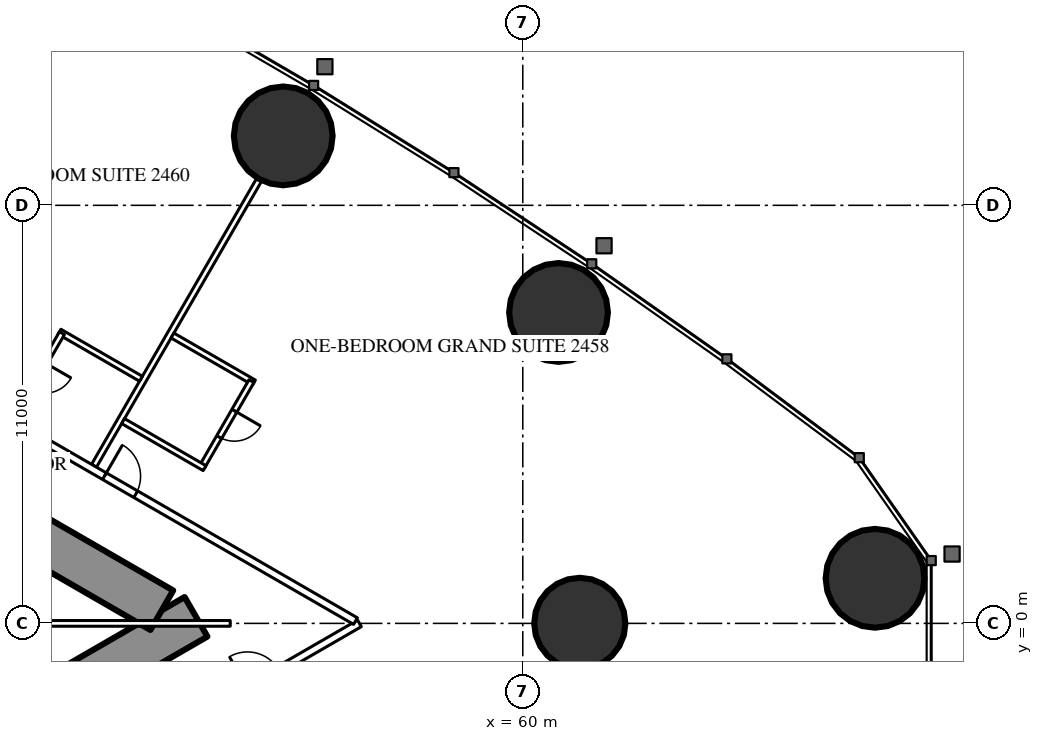
"""IFC4 building model, lengths in metres.
Left out: names, types, materials, properties, quantities, classifications, styles, units other than length and angle.
Written with IfcOpenShell. Run it as: python <this file> out.ifc"""

import sys

from ifc_helpers import new_model, si_unit, direction, frame, frame_2d, origin, origin_2d, place, context, subcontext, project, spatial, rectangle, circle, hollow_circle, extrude, element, fill, save


model = new_model("IFC4")
c1 = context("Model", 3, precision=1e-05, world=origin(), true_north=direction((0.0, 1.0)))
c2 = subcontext(c1, "Body", "Model", "MODEL_VIEW")
j1 = project(units=[si_unit("LENGTHUNIT", "METRE"), si_unit("PLANEANGLEUNIT", "RADIAN")], contexts=[c1])
p1 = place(None, origin())
s1 = spatial("IfcSite", under=j1, at=p1, CompositionType="ELEMENT")
p2 = place(p1, origin())
s2 = spatial("IfcBuilding", under=s1, at=p2, CompositionType="ELEMENT")
p3 = place(p2, frame((0.0, 0.0, 94.1)))
s3 = spatial("IfcBuildingStorey", under=s2, at=p3, CompositionType="ELEMENT", Elevation=94.1)
for number, where, z_axis, x_axis in (
    (1, (69.269, 1.187, 0.0), (0.0, 0.0, 1.0), (1.0, 0.0, 0.0)),
    (2, (60.941, 8.181, 0.0), (0.0, 0.0, 1.0), (1.0, 0.0, 0.0)),
    (3, (53.697, 12.827, 0.0), (0.0, 0.0, 1.0), (1.0, 0.0, 0.0)),
):
    element("IfcColumn", number, at=place(p3, frame(where, z_axis=z_axis, x_axis=x_axis)), inside=s3, PredefinedType="COLUMN", context=c2, shape_type="SweptSolid", body=[
        extrude(hollow_circle(Radius=1.3, WallThickness=0.1, at=origin_2d()), origin(), (0.0, 0.0, 1.0), 3.5),
    ])
p4 = place(p3, frame((61.5, 0.0, 0.0), z_axis=(0.0, 0.0, 1.0), x_axis=(1.0, 0.0, 0.0)))
e4 = element("IfcColumn", 4, at=p4, inside=s3, PredefinedType="COLUMN", context=c2, shape_type="SweptSolid", body=[
    extrude(circle(Radius=1.2, at=origin_2d()), origin(), (0.0, 0.0, 1.0), 3.5),
])
p5 = place(p3, frame((27.2, -13.8, 0.0), z_axis=(0.0, 0.0, 1.0), x_axis=(0.866027159892, 0.499996958321, 0.0)))
e5 = element("IfcWall", 5, at=p5, inside=s3, PredefinedType="SHEAR", context=c2, shape_type="SweptSolid", body=[
    extrude(rectangle(XDim=27.947, YDim=1.2, at=frame_2d((13.973, 0.0))), origin(), (0.0, 0.0, 1.0), 3.5),
])
p6 = place(p5, frame((4.6, 0.0, 0.0)))
e6 = element("IfcOpeningElement", 6, at=p6, cuts=e5, PredefinedType="OPENING", context=c2, shape_type="SweptSolid", body=[
    extrude(rectangle(XDim=1.0, YDim=2.2, at=frame_2d((0.5, 1.1))), frame((0.0, 0.61, 0.0), z_axis=(0.0, -1.0, 0.0), x_axis=(1.0, 0.0, 0.0)), (0.0, 0.0, 1.0), 1.22),
])
p7 = place(p5, frame((13.395, 0.0, 0.0)))
e7 = element("IfcOpeningElement", 7, at=p7, cuts=e5, PredefinedType="OPENING", context=c2, shape_type="SweptSolid", body=[
    extrude(rectangle(XDim=1.8, YDim=2.2, at=frame_2d((0.9, 1.1))), frame((0.0, 0.61, 0.0), z_axis=(0.0, -1.0, 0.0), x_axis=(1.0, 0.0, 0.0)), (0.0, 0.0, 1.0), 1.22),
])
p8 = place(p3, frame((27.2, 13.8, 0.0), z_axis=(0.0, 0.0, 1.0), x_axis=(0.866024515034, -0.500001539357, 0.0)))
e8 = element("IfcWall", 8, at=p8, inside=s3, PredefinedType="SHEAR", context=c2, shape_type="SweptSolid", body=[
    extrude(rectangle(XDim=26.907, YDim=1.2, at=frame_2d((13.454, 0.0))), origin(), (0.0, 0.0, 1.0), 3.5),
])
p9 = place(p8, frame((4.6, 0.0, 0.0)))
e9 = element("IfcOpeningElement", 9, at=p9, cuts=e8, PredefinedType="OPENING", context=c2, shape_type="SweptSolid", body=[
    extrude(rectangle(XDim=1.0, YDim=2.2, at=frame_2d((0.5, 1.1))), frame((0.0, 0.61, 0.0), z_axis=(0.0, -1.0, 0.0), x_axis=(1.0, 0.0, 0.0)), (0.0, 0.0, 1.0), 1.22),
])
p10 = place(p8, frame((13.395, 0.0, 0.0)))
e10 = element("IfcOpeningElement", 10, at=p10, cuts=e8, PredefinedType="OPENING", context=c2, shape_type="SweptSolid", body=[
    extrude(rectangle(XDim=1.8, YDim=2.2, at=frame_2d((0.9, 1.1))), frame((0.0, 0.61, 0.0), z_axis=(0.0, -1.0, 0.0), x_axis=(1.0, 0.0, 0.0)), (0.0, 0.0, 1.0), 1.22),
])
p11 = place(p3, frame((48.719, 4.147, 0.0), z_axis=(0.0, 0.0, 1.0), x_axis=(0.499993328235, 0.866029255696, 0.0)))
e11 = element("IfcWall", 11, at=p11, inside=s3, PredefinedType="PARTITIONING", context=c2, shape_type="SweptSolid", body=[
    extrude(rectangle(XDim=8.686, YDim=0.15, at=frame_2d((4.343, 0.0))), origin(), (0.0, 0.0, 1.0), 2.2),
])
p12 = place(p3, frame((37.96, -10.243, 0.0), z_axis=(0.0, 0.0, 1.0), x_axis=(0.866026429433, 0.499998223521, 0.0)))
e12 = element("IfcWall", 12, at=p12, inside=s3, PredefinedType="PARTITIONING", context=c2, shape_type="SweptSolid", body=[
    extrude(rectangle(XDim=20.487, YDim=0.2, at=frame_2d((10.243, 0.0))), origin(), (0.0, 0.0, 1.0), 3.25),
])
p13 = place(p12, frame((4.047, 0.0, 0.0)))
e13 = element("IfcOpeningElement", 13, at=p13, cuts=e12, PredefinedType="OPENING", context=c2, shape_type="SweptSolid", body=[
    extrude(rectangle(XDim=0.95, YDim=2.2, at=frame_2d((0.475, 1.1))), frame((0.0, 0.11, 0.0), z_axis=(0.0, -1.0, 0.0), x_axis=(1.0, 0.0, 0.0)), (0.0, 0.0, 1.0), 0.22),
])
p14 = place(p12, frame((11.04, 0.0, 0.0)))
e14 = element("IfcOpeningElement", 14, at=p14, cuts=e12, PredefinedType="OPENING", context=c2, shape_type="SweptSolid", body=[
    extrude(rectangle(XDim=0.95, YDim=2.2, at=frame_2d((0.475, 1.1))), frame((0.0, 0.11, 0.0), z_axis=(0.0, -1.0, 0.0), x_axis=(1.0, 0.0, 0.0)), (0.0, 0.0, 1.0), 0.22),
])
p15 = place(p12, frame((13.035, 0.0, 0.0)))
e15 = element("IfcOpeningElement", 15, at=p15, cuts=e12, PredefinedType="OPENING", context=c2, shape_type="SweptSolid", body=[
    extrude(rectangle(XDim=0.95, YDim=2.2, at=frame_2d((0.475, 1.1))), frame((0.0, 0.11, 0.0), z_axis=(0.0, -1.0, 0.0), x_axis=(1.0, 0.0, 0.0)), (0.0, 0.0, 1.0), 0.22),
])
p16 = place(p12, frame((17.085, 0.0, 0.0)))
e16 = element("IfcOpeningElement", 16, at=p16, cuts=e12, PredefinedType="OPENING", context=c2, shape_type="SweptSolid", body=[
    extrude(rectangle(XDim=0.95, YDim=2.2, at=frame_2d((0.475, 1.1))), frame((0.0, 0.11, 0.0), z_axis=(0.0, -1.0, 0.0), x_axis=(1.0, 0.0, 0.0)), (0.0, 0.0, 1.0), 0.22),
])
p17 = place(p12, frame((1.048, 0.0, 0.0)))
e17 = element("IfcOpeningElement", 17, at=p17, cuts=e12, PredefinedType="OPENING", context=c2, shape_type="SweptSolid", body=[
    extrude(rectangle(XDim=1.8, YDim=2.2, at=frame_2d((0.9, 1.1))), frame((0.0, 0.11, 0.0), z_axis=(0.0, -1.0, 0.0), x_axis=(1.0, 0.0, 0.0)), (0.0, 0.0, 1.0), 0.22),
])
p18 = place(p3, frame((36.834, 10.894, 0.0), z_axis=(0.0, 0.0, 1.0), x_axis=(0.866028157229, -0.499995230863, 0.0)))
e18 = element("IfcWall", 18, at=p18, inside=s3, PredefinedType="PARTITIONING", context=c2, shape_type="SweptSolid", body=[
    extrude(rectangle(XDim=21.667, YDim=0.2, at=frame_2d((10.833, 0.0))), origin(), (0.0, 0.0, 1.0), 3.25),
])
p19 = place(p18, frame((14.04, 0.0, 0.0)))
e19 = element("IfcOpeningElement", 19, at=p19, cuts=e18, PredefinedType="OPENING", context=c2, shape_type="SweptSolid", body=[
    extrude(rectangle(XDim=0.95, YDim=2.2, at=frame_2d((0.475, 1.1))), frame((0.0, 0.11, 0.0), z_axis=(0.0, -1.0, 0.0), x_axis=(1.0, 0.0, 0.0)), (0.0, 0.0, 1.0), 0.22),
])
p20 = place(p18, frame((9.99, 0.0, 0.0)))
e20 = element("IfcOpeningElement", 20, at=p20, cuts=e18, PredefinedType="OPENING", context=c2, shape_type="SweptSolid", body=[
    extrude(rectangle(XDim=0.95, YDim=2.2, at=frame_2d((0.475, 1.1))), frame((0.0, 0.11, 0.0), z_axis=(0.0, -1.0, 0.0), x_axis=(1.0, 0.0, 0.0)), (0.0, 0.0, 1.0), 0.22),
])
p21 = place(p18, frame((3.35, 0.0, 0.0)))
e21 = element("IfcOpeningElement", 21, at=p21, cuts=e18, PredefinedType="OPENING", context=c2, shape_type="SweptSolid", body=[
    extrude(rectangle(XDim=1.0, YDim=2.2, at=frame_2d((0.5, 1.1))), frame((0.0, 0.11, 0.0), z_axis=(0.0, -1.0, 0.0), x_axis=(1.0, 0.0, 0.0)), (0.0, 0.0, 1.0), 0.22),
])
p22 = place(p3, frame((50.783, 7.574, 0.0), z_axis=(0.0, 0.0, 1.0), x_axis=(0.866006523861, -0.500032699561, 0.0)))
e22 = element("IfcWall", 22, at=p22, inside=s3, PredefinedType="PARTITIONING", context=c2, shape_type="SweptSolid", body=[
    extrude(rectangle(XDim=2.475, YDim=0.15, at=frame_2d((1.237, 0.0))), origin(), (0.0, 0.0, 1.0), 3.25),
])
p23 = place(p3, frame((51.562, 4.123, 0.0), z_axis=(0.0, 0.0, 1.0), x_axis=(0.49997716683, 0.86603858612, 0.0)))
e23 = element("IfcWall", 23, at=p23, inside=s3, PredefinedType="PARTITIONING", context=c2, shape_type="SweptSolid", body=[
    extrude(rectangle(XDim=2.6, YDim=0.15, at=frame_2d((1.3, 0.0))), origin(), (0.0, 0.0, 1.0), 3.25),
])
p24 = place(p23, frame((0.9, 0.0, 0.0)))
e24 = element("IfcOpeningElement", 24, at=p24, cuts=e23, PredefinedType="OPENING", context=c2, shape_type="SweptSolid", body=[
    extrude(rectangle(XDim=0.8, YDim=2.2, at=frame_2d((0.4, 1.1))), frame((0.0, 0.085, 0.0), z_axis=(0.0, -1.0, 0.0), x_axis=(1.0, 0.0, 0.0)), (0.0, 0.0, 1.0), 0.17),
])
for number, where, z_axis, x_axis in (
    (25, (49.483, 5.323, 0.0), (0.0, 0.0, 1.0), (0.866, -0.5, 0.0)),
    (26, (47.81, 7.674, 0.0), (0.0, 0.0, 1.0), (0.866, -0.5, 0.0)),
):
    element("IfcWall", number, at=place(p3, frame(where, z_axis=z_axis, x_axis=x_axis)), inside=s3, PredefinedType="PARTITIONING", context=c2, shape_type="SweptSolid", body=[
        extrude(rectangle(XDim=2.475, YDim=0.15, at=frame_2d((1.238, 0.0))), origin(), (0.0, 0.0, 1.0), 3.25),
    ])
p25 = place(p3, frame((46.575, 5.385, 0.0), z_axis=(0.0, 0.0, 1.0), x_axis=(0.500006934395, 0.866021400173, 0.0)))
e27 = element("IfcWall", 27, at=p25, inside=s3, PredefinedType="PARTITIONING", context=c2, shape_type="SweptSolid", body=[
    extrude(rectangle(XDim=2.6, YDim=0.15, at=frame_2d((1.3, 0.0))), origin(), (0.0, 0.0, 1.0), 3.25),
])
p26 = place(p25, frame((0.9, 0.0, 0.0)))
e28 = element("IfcOpeningElement", 28, at=p26, cuts=e27, PredefinedType="OPENING", context=c2, shape_type="SweptSolid", body=[
    extrude(rectangle(XDim=0.8, YDim=2.2, at=frame_2d((0.4, 1.1))), frame((0.0, 0.085, 0.0), z_axis=(0.0, -1.0, 0.0), x_axis=(1.0, 0.0, 0.0)), (0.0, 0.0, 1.0), 0.17),
])
p27 = place(p3, frame((44.575, 0.0, 0.0), z_axis=(0.0, 0.0, 1.0), x_axis=(1.0, 0.0, 0.0)))
e29 = element("IfcWall", 29, at=p27, inside=s3, PredefinedType="PARTITIONING", context=c2, shape_type="SweptSolid", body=[
    extrude(rectangle(XDim=7.727, YDim=0.15, at=frame_2d((3.864, 0.0))), origin(), (0.0, 0.0, 1.0), 2.2),
])
p28 = place(p24, origin())
e30 = element("IfcDoor", 30, at=p28, inside=s3, OperationType="SINGLE_SWING_RIGHT", PredefinedType="DOOR", context=c2, shape_type="SweptSolid", body=[
    extrude(rectangle(XDim=0.8, YDim=2.2, at=frame_2d((0.4, 1.1))), frame((0.0, 0.025, 0.0), z_axis=(0.0, -1.0, 0.0), x_axis=(1.0, 0.0, 0.0)), (0.0, 0.0, 1.0), 0.05),
])
fill(e24, e30)
p29 = place(p19, origin())
e31 = element("IfcDoor", 31, at=p29, inside=s3, OperationType="SINGLE_SWING_LEFT", PredefinedType="DOOR", context=c2, shape_type="SweptSolid", body=[
    extrude(rectangle(XDim=0.95, YDim=2.2, at=frame_2d((0.475, 1.1))), frame((0.0, 0.025, 0.0), z_axis=(0.0, -1.0, 0.0), x_axis=(1.0, 0.0, 0.0)), (0.0, 0.0, 1.0), 0.05),
])
fill(e19, e31)
save(model, sys.argv[1])
